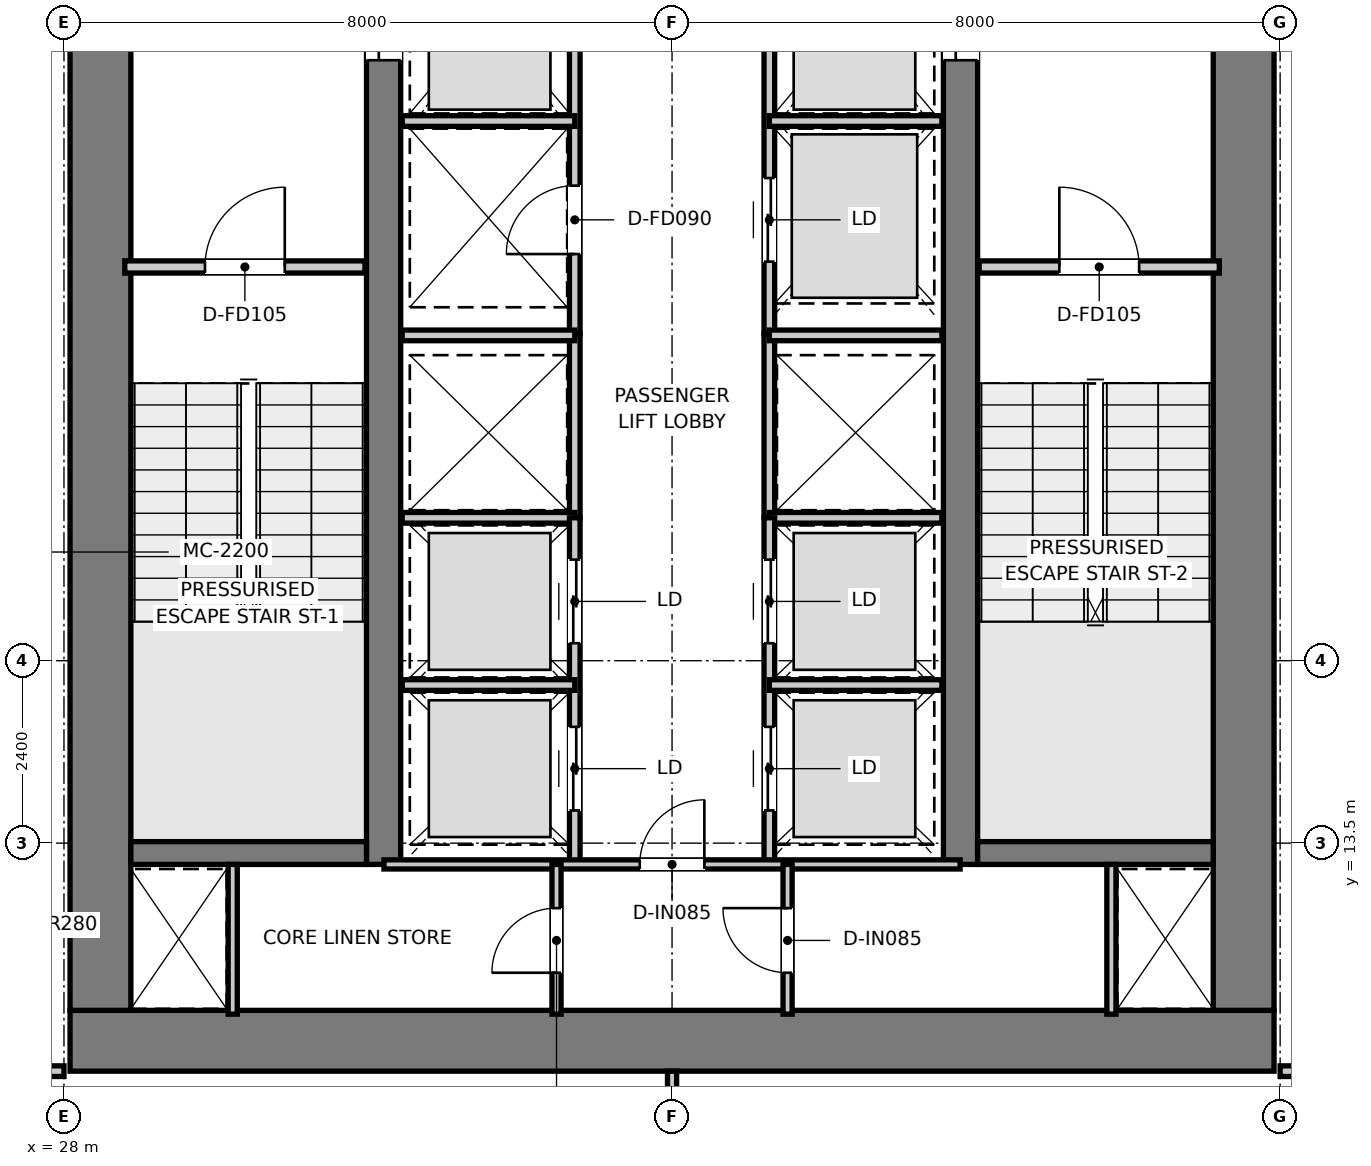
"""IFC4 building model, lengths in metres.
Left out: names, types, materials, properties, quantities, classifications, styles, units other than length and angle.
Written with IfcOpenShell. Run it as: python <this file> out.ifc"""

import sys

from ifc_helpers import new_model, si_unit, direction, frame, frame_2d, origin, place, context, subcontext, project, spatial, rectangle, extrude, element, fill, save


model = new_model("IFC4")
c1 = context("Model", 3, precision=1e-05, world=origin(), true_north=direction((0.0, 1.0)))
c2 = subcontext(c1, "Body", "Model", "MODEL_VIEW")
j1 = project(units=[si_unit("LENGTHUNIT", "METRE"), si_unit("PLANEANGLEUNIT", "RADIAN")], contexts=[c1])
p1 = place(None, origin())
s1 = spatial("IfcSite", under=j1, at=p1, CompositionType="ELEMENT")
p2 = place(p1, origin())
s2 = spatial("IfcBuilding", under=s1, at=p2, CompositionType="ELEMENT")
p3 = place(p2, frame((0.0, 0.0, 76.35)))
s3 = spatial("IfcBuildingStorey", under=s2, at=p3, CompositionType="ELEMENT", Elevation=76.35)
p4 = place(p3, frame((28.08, 10.9, 0.0), z_axis=(0.0, 0.0, 1.0), x_axis=(1.0, 0.0, 0.0)))
e1 = element("IfcWall", 1, at=p4, inside=s3, PredefinedType="SHEAR", context=c2, shape_type="SweptSolid", body=[
    extrude(rectangle(XDim=15.84, YDim=0.8, at=frame_2d((7.92, 0.0))), origin(), (0.0, 0.0, 1.0), 3.95),
])
for number, where, z_axis, x_axis in (
    (2, (28.48, 11.3, 0.0), (0.0, 0.0, 1.0), (0.0, 1.0, 0.0)),
    (3, (43.52, 11.3, 0.0), (0.0, 0.0, 1.0), (0.0, 1.0, 0.0)),
):
    element("IfcWall", number, at=place(p3, frame(where, z_axis=z_axis, x_axis=x_axis)), inside=s3, PredefinedType="SHEAR", context=c2, shape_type="SweptSolid", body=[
        extrude(rectangle(XDim=14.7, YDim=0.8, at=frame_2d((7.35, 0.0))), origin(), (0.0, 0.0, 1.0), 3.95),
    ])
p5 = place(p3, frame((32.205, 13.22, 0.0), z_axis=(0.0, 0.0, 1.0), x_axis=(0.0, 1.0, 0.0)))
e4 = element("IfcWall", 4, at=p5, inside=s3, PredefinedType="SHEAR", context=c2, shape_type="SweptSolid", body=[
    extrude(rectangle(XDim=12.78, YDim=0.45, at=frame_2d((6.39, 0.0))), origin(), (0.0, 0.0, 1.0), 3.95),
])
p6 = place(p5, frame((10.58, 0.0, 0.0)))
e5 = element("IfcOpeningElement", 5, at=p6, cuts=e4, PredefinedType="OPENING", context=c2, shape_type="SweptSolid", body=[
    extrude(rectangle(XDim=1.1, YDim=2.15, at=frame_2d((0.55, 1.075))), frame((0.0, 0.235, 0.0), z_axis=(0.0, -1.0, 0.0), x_axis=(1.0, 0.0, 0.0)), (0.0, 0.0, 1.0), 0.47),
])
p7 = place(p3, frame((39.795, 13.22, 0.0), z_axis=(0.0, 0.0, 1.0), x_axis=(0.0, 1.0, 0.0)))
e6 = element("IfcWall", 6, at=p7, inside=s3, PredefinedType="SHEAR", context=c2, shape_type="SweptSolid", body=[
    extrude(rectangle(XDim=12.78, YDim=0.45, at=frame_2d((6.39, 0.0))), origin(), (0.0, 0.0, 1.0), 3.95),
])
p8 = place(p7, frame((10.58, 0.0, 0.0)))
e7 = element("IfcOpeningElement", 7, at=p8, cuts=e6, PredefinedType="OPENING", context=c2, shape_type="SweptSolid", body=[
    extrude(rectangle(XDim=1.1, YDim=2.15, at=frame_2d((0.55, 1.075))), frame((0.0, 0.235, 0.0), z_axis=(0.0, -1.0, 0.0), x_axis=(1.0, 0.0, 0.0)), (0.0, 0.0, 1.0), 0.47),
])
for number, where, z_axis, x_axis in (
    (8, (28.88, 13.37, 0.0), (0.0, 0.0, 1.0), (1.0, 0.0, 0.0)),
    (9, (40.02, 13.37, 0.0), (0.0, 0.0, 1.0), (1.0, 0.0, 0.0)),
):
    element("IfcWall", number, at=place(p3, frame(where, z_axis=z_axis, x_axis=x_axis)), inside=s3, PredefinedType="SHEAR", context=c2, shape_type="SweptSolid", body=[
        extrude(rectangle(XDim=3.1, YDim=0.3, at=frame_2d((1.55, 0.0))), origin(), (0.0, 0.0, 1.0), 3.95),
    ])
p9 = place(p3, frame((28.8, 21.08, 0.0), z_axis=(0.0, 0.0, 1.0), x_axis=(1.0, 0.0, 0.0)))
e10 = element("IfcWall", 10, at=p9, inside=s3, PredefinedType="PARTITIONING", context=c2, shape_type="SweptSolid", body=[
    extrude(rectangle(XDim=3.16, YDim=0.16, at=frame_2d((1.58, 0.0))), origin(), (0.0, 0.0, 1.0), 3.59),
])
p10 = place(p9, frame((1.055, 0.0, 0.0)))
e11 = element("IfcOpeningElement", 11, at=p10, cuts=e10, PredefinedType="OPENING", context=c2, shape_type="SweptSolid", body=[
    extrude(rectangle(XDim=1.05, YDim=2.1, at=frame_2d((0.525, 1.05))), frame((0.0, 0.09, 0.0), z_axis=(0.0, -1.0, 0.0), x_axis=(1.0, 0.0, 0.0)), (0.0, 0.0, 1.0), 0.18),
])
p11 = place(p3, frame((40.04, 21.08, 0.0), z_axis=(0.0, 0.0, 1.0), x_axis=(1.0, 0.0, 0.0)))
e12 = element("IfcWall", 12, at=p11, inside=s3, PredefinedType="PARTITIONING", context=c2, shape_type="SweptSolid", body=[
    extrude(rectangle(XDim=3.16, YDim=0.16, at=frame_2d((1.58, 0.0))), origin(), (0.0, 0.0, 1.0), 3.59),
])
p12 = place(p11, frame((1.055, 0.0, 0.0)))
e13 = element("IfcOpeningElement", 13, at=p12, cuts=e12, PredefinedType="OPENING", context=c2, shape_type="SweptSolid", body=[
    extrude(rectangle(XDim=1.05, YDim=2.1, at=frame_2d((0.525, 1.05))), frame((0.0, 0.09, 0.0), z_axis=(0.0, -1.0, 0.0), x_axis=(1.0, 0.0, 0.0)), (0.0, 0.0, 1.0), 0.18),
])
p13 = place(p3, frame((34.72, 20.2, 0.0), z_axis=(0.0, 0.0, 1.0), x_axis=(0.0, 1.0, 0.0)))
e14 = element("IfcWall", 14, at=p13, inside=s3, PredefinedType="PARTITIONING", context=c2, shape_type="SweptSolid", body=[
    extrude(rectangle(XDim=5.78, YDim=0.14, at=frame_2d((2.89, 0.0))), origin(), (0.0, 0.0, 1.0), 2.39),
])
p14 = place(p13, frame((1.05, 0.0, 0.0)))
e15 = element("IfcOpeningElement", 15, at=p14, cuts=e14, PredefinedType="OPENING", context=c2, shape_type="SweptSolid", body=[
    extrude(rectangle(XDim=0.9, YDim=2.1, at=frame_2d((0.45, 1.05))), frame((0.0, 0.08, 0.0), z_axis=(0.0, -1.0, 0.0), x_axis=(1.0, 0.0, 0.0)), (0.0, 0.0, 1.0), 0.16),
])
p15 = place(p3, frame((37.28, 20.2, 0.0), z_axis=(0.0, 0.0, 1.0), x_axis=(0.0, 1.0, 0.0)))
e16 = element("IfcWall", 16, at=p15, inside=s3, PredefinedType="PARTITIONING", context=c2, shape_type="SweptSolid", body=[
    extrude(rectangle(XDim=5.78, YDim=0.14, at=frame_2d((2.89, 0.0))), origin(), (0.0, 0.0, 1.0), 2.39),
])
p16 = place(p15, frame((0.95, 0.0, 0.0)))
e17 = element("IfcOpeningElement", 17, at=p16, cuts=e16, PredefinedType="OPENING", context=c2, shape_type="SweptSolid", body=[
    extrude(rectangle(XDim=1.1, YDim=2.15, at=frame_2d((0.55, 1.075))), frame((0.0, 0.08, 0.0), z_axis=(0.0, -1.0, 0.0), x_axis=(1.0, 0.0, 0.0)), (0.0, 0.0, 1.0), 0.16),
])
for number, where, z_axis, x_axis in (
    (18, (32.45, 23.0, 0.0), (0.0, 0.0, 1.0), (1.0, 0.0, 0.0)),
    (19, (37.28, 23.0, 0.0), (0.0, 0.0, 1.0), (1.0, 0.0, 0.0)),
):
    element("IfcWall", number, at=place(p3, frame(where, z_axis=z_axis, x_axis=x_axis)), inside=s3, PredefinedType="PARTITIONING", context=c2, shape_type="SweptSolid", body=[
        extrude(rectangle(XDim=2.27, YDim=0.14, at=frame_2d((1.135, 0.0))), origin(), (0.0, 0.0, 1.0), 2.39),
    ])
for number, where, z_axis, x_axis in (
    (20, (34.72, 17.78, 0.0), (0.0, 0.0, 1.0), (0.0, 1.0, 0.0)),
    (21, (37.28, 17.78, 0.0), (0.0, 0.0, 1.0), (0.0, 1.0, 0.0)),
):
    element("IfcWall", number, at=place(p3, frame(where, z_axis=z_axis, x_axis=x_axis)), inside=s3, PredefinedType="PARTITIONING", context=c2, shape_type="SweptSolid", body=[
        extrude(rectangle(XDim=2.42, YDim=0.14, at=frame_2d((1.21, 0.0))), origin(), (0.0, 0.0, 1.0), 3.59),
    ])
for number, where, z_axis, x_axis in (
    (22, (32.45, 17.78, 0.0), (0.0, 0.0, 1.0), (1.0, 0.0, 0.0)),
    (23, (32.45, 20.18, 0.0), (0.0, 0.0, 1.0), (1.0, 0.0, 0.0)),
    (24, (37.28, 17.78, 0.0), (0.0, 0.0, 1.0), (1.0, 0.0, 0.0)),
    (25, (37.28, 20.18, 0.0), (0.0, 0.0, 1.0), (1.0, 0.0, 0.0)),
):
    element("IfcWall", number, at=place(p3, frame(where, z_axis=z_axis, x_axis=x_axis)), inside=s3, PredefinedType="PARTITIONING", context=c2, shape_type="SweptSolid", body=[
        extrude(rectangle(XDim=2.27, YDim=0.14, at=frame_2d((1.135, 0.0))), origin(), (0.0, 0.0, 1.0), 3.59),
    ])
p17 = place(p3, frame((34.72, 13.22, 0.0), z_axis=(0.0, 0.0, 1.0), x_axis=(0.0, 1.0, 0.0)))
e26 = element("IfcWall", 26, at=p17, inside=s3, PredefinedType="PARTITIONING", context=c2, shape_type="SweptSolid", body=[
    extrude(rectangle(XDim=4.56, YDim=0.14, at=frame_2d((2.28, 0.0))), origin(), (0.0, 0.0, 1.0), 3.59),
])
p18 = place(p17, frame((0.71, 0.0, 0.0)))
e27 = element("IfcOpeningElement", 27, at=p18, cuts=e26, PredefinedType="OPENING", context=c2, shape_type="SweptSolid", body=[
    extrude(rectangle(XDim=1.1, YDim=2.15, at=frame_2d((0.55, 1.075))), frame((0.0, 0.08, 0.0), z_axis=(0.0, -1.0, 0.0), x_axis=(1.0, 0.0, 0.0)), (0.0, 0.0, 1.0), 0.16),
])
p19 = place(p17, frame((2.91, 0.0, 0.0)))
e28 = element("IfcOpeningElement", 28, at=p19, cuts=e26, PredefinedType="OPENING", context=c2, shape_type="SweptSolid", body=[
    extrude(rectangle(XDim=1.1, YDim=2.15, at=frame_2d((0.55, 1.075))), frame((0.0, 0.08, 0.0), z_axis=(0.0, -1.0, 0.0), x_axis=(1.0, 0.0, 0.0)), (0.0, 0.0, 1.0), 0.16),
])
p20 = place(p3, frame((32.45, 15.58, 0.0), z_axis=(0.0, 0.0, 1.0), x_axis=(1.0, 0.0, 0.0)))
e29 = element("IfcWall", 29, at=p20, inside=s3, PredefinedType="PARTITIONING", context=c2, shape_type="SweptSolid", body=[
    extrude(rectangle(XDim=2.27, YDim=0.14, at=frame_2d((1.135, 0.0))), origin(), (0.0, 0.0, 1.0), 3.59),
])
p21 = place(p3, frame((37.28, 13.22, 0.0), z_axis=(0.0, 0.0, 1.0), x_axis=(0.0, 1.0, 0.0)))
e30 = element("IfcWall", 30, at=p21, inside=s3, PredefinedType="PARTITIONING", context=c2, shape_type="SweptSolid", body=[
    extrude(rectangle(XDim=4.56, YDim=0.14, at=frame_2d((2.28, 0.0))), origin(), (0.0, 0.0, 1.0), 3.59),
])
p22 = place(p21, frame((0.71, 0.0, 0.0)))
e31 = element("IfcOpeningElement", 31, at=p22, cuts=e30, PredefinedType="OPENING", context=c2, shape_type="SweptSolid", body=[
    extrude(rectangle(XDim=1.1, YDim=2.15, at=frame_2d((0.55, 1.075))), frame((0.0, 0.08, 0.0), z_axis=(0.0, -1.0, 0.0), x_axis=(1.0, 0.0, 0.0)), (0.0, 0.0, 1.0), 0.16),
])
p23 = place(p21, frame((2.91, 0.0, 0.0)))
e32 = element("IfcOpeningElement", 32, at=p23, cuts=e30, PredefinedType="OPENING", context=c2, shape_type="SweptSolid", body=[
    extrude(rectangle(XDim=1.1, YDim=2.15, at=frame_2d((0.55, 1.075))), frame((0.0, 0.08, 0.0), z_axis=(0.0, -1.0, 0.0), x_axis=(1.0, 0.0, 0.0)), (0.0, 0.0, 1.0), 0.16),
])
p24 = place(p3, frame((37.28, 15.58, 0.0), z_axis=(0.0, 0.0, 1.0), x_axis=(1.0, 0.0, 0.0)))
e33 = element("IfcWall", 33, at=p24, inside=s3, PredefinedType="PARTITIONING", context=c2, shape_type="SweptSolid", body=[
    extrude(rectangle(XDim=2.27, YDim=0.14, at=frame_2d((1.135, 0.0))), origin(), (0.0, 0.0, 1.0), 3.59),
])
for number, where, z_axis, x_axis in (
    (34, (30.22, 11.25, 0.0), (0.0, 0.0, 1.0), (0.0, 1.0, 0.0)),
    (35, (41.78, 11.25, 0.0), (0.0, 0.0, 1.0), (0.0, 1.0, 0.0)),
):
    element("IfcWall", number, at=place(p3, frame(where, z_axis=z_axis, x_axis=x_axis)), inside=s3, PredefinedType="PARTITIONING", context=c2, shape_type="SweptSolid", body=[
        extrude(rectangle(XDim=1.97, YDim=0.12, at=frame_2d((0.985, 0.0))), origin(), (0.0, 0.0, 1.0), 3.59),
    ])
p25 = place(p3, frame((32.21, 13.22, 0.0), z_axis=(0.0, 0.0, 1.0), x_axis=(1.0, 0.0, 0.0)))
e36 = element("IfcWall", 36, at=p25, inside=s3, PredefinedType="PARTITIONING", context=c2, shape_type="SweptSolid", body=[
    extrude(rectangle(XDim=7.58, YDim=0.12, at=frame_2d((3.79, 0.0))), origin(), (0.0, 0.0, 1.0), 3.59),
])
p26 = place(p25, frame((3.365, 0.0, 0.0)))
e37 = element("IfcOpeningElement", 37, at=p26, cuts=e36, PredefinedType="OPENING", context=c2, shape_type="SweptSolid", body=[
    extrude(rectangle(XDim=0.85, YDim=2.1, at=frame_2d((0.425, 1.05))), frame((0.0, 0.07, 0.0), z_axis=(0.0, -1.0, 0.0), x_axis=(1.0, 0.0, 0.0)), (0.0, 0.0, 1.0), 0.14),
])
p27 = place(p3, frame((34.48, 11.25, 0.0), z_axis=(0.0, 0.0, 1.0), x_axis=(0.0, 1.0, 0.0)))
e38 = element("IfcWall", 38, at=p27, inside=s3, PredefinedType="PARTITIONING", context=c2, shape_type="SweptSolid", body=[
    extrude(rectangle(XDim=1.97, YDim=0.12, at=frame_2d((0.985, 0.0))), origin(), (0.0, 0.0, 1.0), 3.59),
])
p28 = place(p27, frame((0.545, 0.0, 0.0)))
e39 = element("IfcOpeningElement", 39, at=p28, cuts=e38, PredefinedType="OPENING", context=c2, shape_type="SweptSolid", body=[
    extrude(rectangle(XDim=0.85, YDim=2.1, at=frame_2d((0.425, 1.05))), frame((0.0, 0.07, 0.0), z_axis=(0.0, -1.0, 0.0), x_axis=(1.0, 0.0, 0.0)), (0.0, 0.0, 1.0), 0.14),
])
p29 = place(p3, frame((37.52, 11.25, 0.0), z_axis=(0.0, 0.0, 1.0), x_axis=(0.0, 1.0, 0.0)))
e40 = element("IfcWall", 40, at=p29, inside=s3, PredefinedType="PARTITIONING", context=c2, shape_type="SweptSolid", body=[
    extrude(rectangle(XDim=1.97, YDim=0.12, at=frame_2d((0.985, 0.0))), origin(), (0.0, 0.0, 1.0), 3.59),
])
p30 = place(p29, frame((0.545, 0.0, 0.0)))
e41 = element("IfcOpeningElement", 41, at=p30, cuts=e40, PredefinedType="OPENING", context=c2, shape_type="SweptSolid", body=[
    extrude(rectangle(XDim=0.85, YDim=2.1, at=frame_2d((0.425, 1.05))), frame((0.0, 0.07, 0.0), z_axis=(0.0, -1.0, 0.0), x_axis=(1.0, 0.0, 0.0)), (0.0, 0.0, 1.0), 0.14),
])
p31 = place(p3, frame((26.32, 10.5, 0.0), z_axis=(0.0, 0.0, 1.0), x_axis=(1.0, 0.0, 0.0)))
e42 = element("IfcWall", 42, at=p31, inside=s3, PredefinedType="PARTITIONING", context=c2, shape_type="SweptSolid", body=[
    extrude(rectangle(XDim=1.68, YDim=0.14, at=frame_2d((0.84, 0.0))), origin(), (0.0, 0.0, 1.0), 3.59),
])
p32 = place(p31, frame((0.445, 0.0, 0.0)))
e43 = element("IfcOpeningElement", 43, at=p32, cuts=e42, PredefinedType="OPENING", context=c2, shape_type="SweptSolid", body=[
    extrude(rectangle(XDim=0.85, YDim=2.1, at=frame_2d((0.425, 1.05))), frame((0.0, 0.08, 0.0), z_axis=(0.0, -1.0, 0.0), x_axis=(1.0, 0.0, 0.0)), (0.0, 0.0, 1.0), 0.16),
])
p33 = place(p3, frame((44.0, 10.5, 0.0), z_axis=(0.0, 0.0, 1.0), x_axis=(1.0, 0.0, 0.0)))
e44 = element("IfcWall", 44, at=p33, inside=s3, PredefinedType="PARTITIONING", context=c2, shape_type="SweptSolid", body=[
    extrude(rectangle(XDim=1.68, YDim=0.14, at=frame_2d((0.84, 0.0))), origin(), (0.0, 0.0, 1.0), 3.59),
])
p34 = place(p33, frame((0.385, 0.0, 0.0)))
e45 = element("IfcOpeningElement", 45, at=p34, cuts=e44, PredefinedType="OPENING", context=c2, shape_type="SweptSolid", body=[
    extrude(rectangle(XDim=0.85, YDim=2.1, at=frame_2d((0.425, 1.05))), frame((0.0, 0.08, 0.0), z_axis=(0.0, -1.0, 0.0), x_axis=(1.0, 0.0, 0.0)), (0.0, 0.0, 1.0), 0.16),
])
p35 = place(p3, frame((36.0, 1.513, 0.0), z_axis=(0.0, 0.0, 1.0), x_axis=(0.0, 1.0, 0.0)))
e46 = element("IfcWall", 46, at=p35, inside=s3, PredefinedType="PARTITIONING", context=c2, shape_type="SweptSolid", body=[
    extrude(rectangle(XDim=8.987, YDim=0.12, at=frame_2d((4.493, 0.0))), origin(), (0.0, 0.0, 1.0), 3.59),
])
p36 = place(p10, origin())
e47 = element("IfcDoor", 47, at=p36, inside=s3, OperationType="SINGLE_SWING_RIGHT", PredefinedType="DOOR", context=c2, shape_type="SweptSolid", body=[
    extrude(rectangle(XDim=1.05, YDim=2.1, at=frame_2d((0.525, 1.05))), frame((0.0, 0.025, 0.0), z_axis=(0.0, -1.0, 0.0), x_axis=(1.0, 0.0, 0.0)), (0.0, 0.0, 1.0), 0.05),
])
fill(e11, e47)
p37 = place(p12, origin())
e48 = element("IfcDoor", 48, at=p37, inside=s3, OperationType="SINGLE_SWING_LEFT", PredefinedType="DOOR", context=c2, shape_type="SweptSolid", body=[
    extrude(rectangle(XDim=1.05, YDim=2.1, at=frame_2d((0.525, 1.05))), frame((0.0, 0.025, 0.0), z_axis=(0.0, -1.0, 0.0), x_axis=(1.0, 0.0, 0.0)), (0.0, 0.0, 1.0), 0.05),
])
fill(e13, e48)
p38 = place(p6, origin())
e49 = element("IfcDoor", 49, at=p38, inside=s3, OperationType="DOUBLE_DOOR_SLIDING", PredefinedType="DOOR", context=c2, shape_type="SweptSolid", body=[
    extrude(rectangle(XDim=1.1, YDim=2.15, at=frame_2d((0.55, 1.075))), frame((0.0, 0.025, 0.0), z_axis=(0.0, -1.0, 0.0), x_axis=(1.0, 0.0, 0.0)), (0.0, 0.0, 1.0), 0.05),
])
fill(e5, e49)
p39 = place(p8, origin())
e50 = element("IfcDoor", 50, at=p39, inside=s3, OperationType="DOUBLE_DOOR_SLIDING", PredefinedType="DOOR", context=c2, shape_type="SweptSolid", body=[
    extrude(rectangle(XDim=1.1, YDim=2.15, at=frame_2d((0.55, 1.075))), frame((0.0, 0.025, 0.0), z_axis=(0.0, -1.0, 0.0), x_axis=(1.0, 0.0, 0.0)), (0.0, 0.0, 1.0), 0.05),
])
fill(e7, e50)
p40 = place(p14, origin())
e51 = element("IfcDoor", 51, at=p40, inside=s3, OperationType="SINGLE_SWING_LEFT", PredefinedType="DOOR", context=c2, shape_type="SweptSolid", body=[
    extrude(rectangle(XDim=0.9, YDim=2.1, at=frame_2d((0.45, 1.05))), frame((0.0, 0.025, 0.0), z_axis=(0.0, -1.0, 0.0), x_axis=(1.0, 0.0, 0.0)), (0.0, 0.0, 1.0), 0.05),
])
fill(e15, e51)
p41 = place(p16, origin())
e52 = element("IfcDoor", 52, at=p41, inside=s3, OperationType="DOUBLE_DOOR_SLIDING", PredefinedType="DOOR", context=c2, shape_type="SweptSolid", body=[
    extrude(rectangle(XDim=1.1, YDim=2.15, at=frame_2d((0.55, 1.075))), frame((0.0, 0.025, 0.0), z_axis=(0.0, -1.0, 0.0), x_axis=(1.0, 0.0, 0.0)), (0.0, 0.0, 1.0), 0.05),
])
fill(e17, e52)
p42 = place(p18, origin())
e53 = element("IfcDoor", 53, at=p42, inside=s3, OperationType="DOUBLE_DOOR_SLIDING", PredefinedType="DOOR", context=c2, shape_type="SweptSolid", body=[
    extrude(rectangle(XDim=1.1, YDim=2.15, at=frame_2d((0.55, 1.075))), frame((0.0, 0.025, 0.0), z_axis=(0.0, -1.0, 0.0), x_axis=(1.0, 0.0, 0.0)), (0.0, 0.0, 1.0), 0.05),
])
fill(e27, e53)
p43 = place(p19, origin())
e54 = element("IfcDoor", 54, at=p43, inside=s3, OperationType="DOUBLE_DOOR_SLIDING", PredefinedType="DOOR", context=c2, shape_type="SweptSolid", body=[
    extrude(rectangle(XDim=1.1, YDim=2.15, at=frame_2d((0.55, 1.075))), frame((0.0, 0.025, 0.0), z_axis=(0.0, -1.0, 0.0), x_axis=(1.0, 0.0, 0.0)), (0.0, 0.0, 1.0), 0.05),
])
fill(e28, e54)
p44 = place(p22, origin())
e55 = element("IfcDoor", 55, at=p44, inside=s3, OperationType="DOUBLE_DOOR_SLIDING", PredefinedType="DOOR", context=c2, shape_type="SweptSolid", body=[
    extrude(rectangle(XDim=1.1, YDim=2.15, at=frame_2d((0.55, 1.075))), frame((0.0, 0.025, 0.0), z_axis=(0.0, -1.0, 0.0), x_axis=(1.0, 0.0, 0.0)), (0.0, 0.0, 1.0), 0.05),
])
fill(e31, e55)
p45 = place(p23, origin())
e56 = element("IfcDoor", 56, at=p45, inside=s3, OperationType="DOUBLE_DOOR_SLIDING", PredefinedType="DOOR", context=c2, shape_type="SweptSolid", body=[
    extrude(rectangle(XDim=1.1, YDim=2.15, at=frame_2d((0.55, 1.075))), frame((0.0, 0.025, 0.0), z_axis=(0.0, -1.0, 0.0), x_axis=(1.0, 0.0, 0.0)), (0.0, 0.0, 1.0), 0.05),
])
fill(e32, e56)
p46 = place(p26, origin())
e57 = element("IfcDoor", 57, at=p46, inside=s3, OperationType="SINGLE_SWING_RIGHT", PredefinedType="DOOR", context=c2, shape_type="SweptSolid", body=[
    extrude(rectangle(XDim=0.85, YDim=2.1, at=frame_2d((0.425, 1.05))), frame((0.0, 0.025, 0.0), z_axis=(0.0, -1.0, 0.0), x_axis=(1.0, 0.0, 0.0)), (0.0, 0.0, 1.0), 0.05),
])
fill(e37, e57)
p47 = place(p28, origin())
e58 = element("IfcDoor", 58, at=p47, inside=s3, OperationType="SINGLE_SWING_LEFT", PredefinedType="DOOR", context=c2, shape_type="SweptSolid", body=[
    extrude(rectangle(XDim=0.85, YDim=2.1, at=frame_2d((0.425, 1.05))), frame((0.0, 0.025, 0.0), z_axis=(0.0, -1.0, 0.0), x_axis=(1.0, 0.0, 0.0)), (0.0, 0.0, 1.0), 0.05),
])
fill(e39, e58)
p48 = place(p30, origin())
e59 = element("IfcDoor", 59, at=p48, inside=s3, OperationType="SINGLE_SWING_RIGHT", PredefinedType="DOOR", context=c2, shape_type="SweptSolid", body=[
    extrude(rectangle(XDim=0.85, YDim=2.1, at=frame_2d((0.425, 1.05))), frame((0.0, 0.025, 0.0), z_axis=(0.0, -1.0, 0.0), x_axis=(1.0, 0.0, 0.0)), (0.0, 0.0, 1.0), 0.05),
])
fill(e41, e59)
save(model, sys.argv[1])
